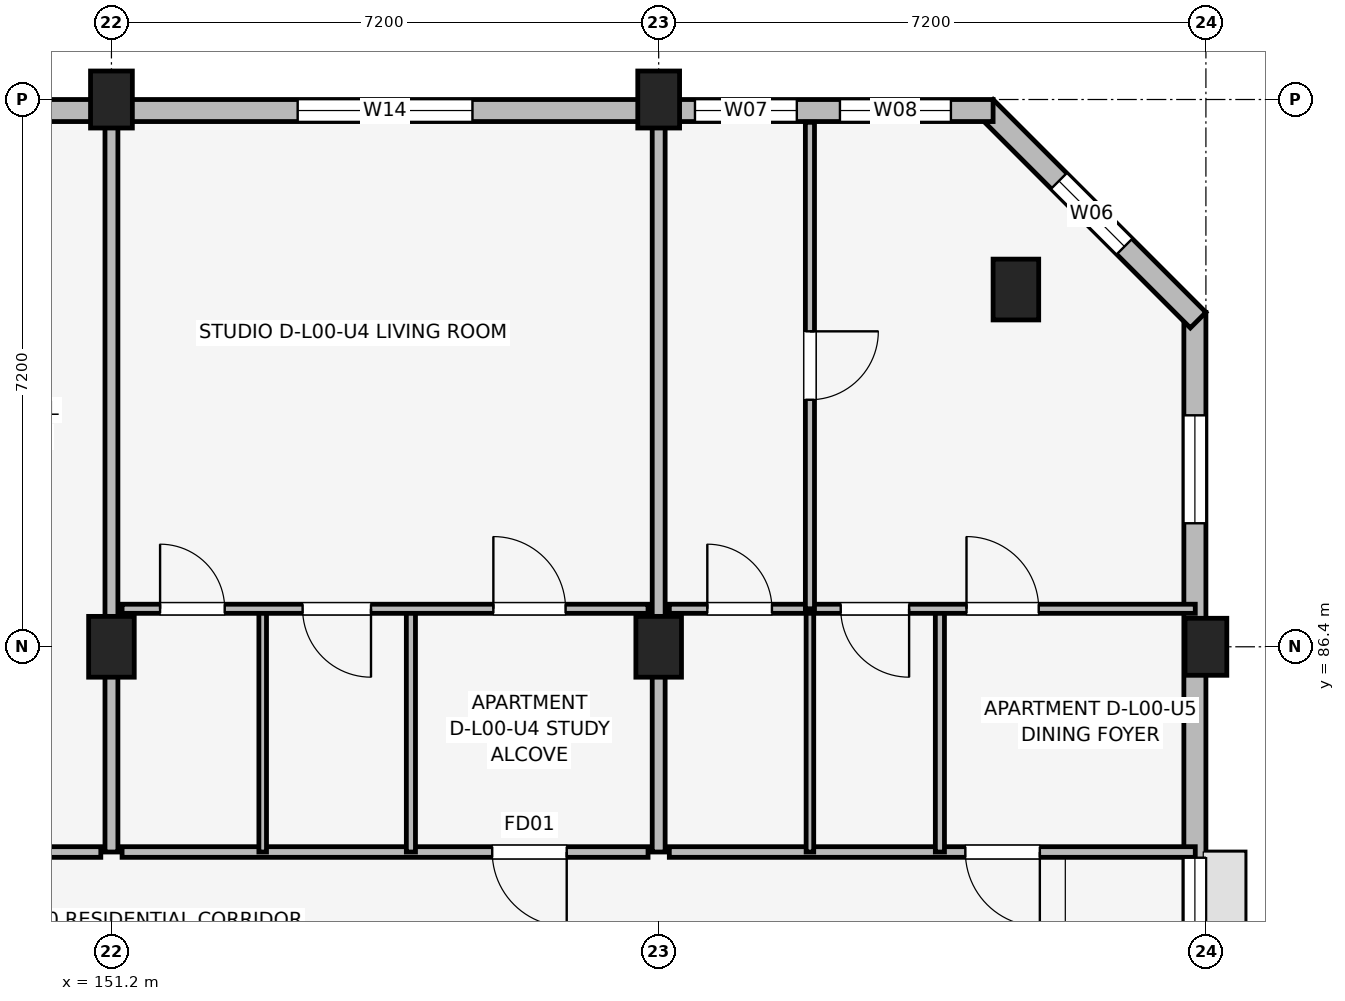
"""IFC4 building model, lengths in metres.
Left out: names, types, materials, properties, quantities, classifications, styles, units other than length and angle.
Written with IfcOpenShell. Run it as: python <this file> out.ifc"""

import sys

from ifc_helpers import new_model, si_unit, direction, frame, frame_2d, origin, origin_2d, place, context, subcontext, project, spatial, rectangle, extrude, element, fill, save


model = new_model("IFC4")
c1 = context("Model", 3, precision=1e-05, world=origin(), true_north=direction((0.0, 1.0)))
c2 = subcontext(c1, "Body", "Model", "MODEL_VIEW")
j1 = project(units=[si_unit("LENGTHUNIT", "METRE"), si_unit("PLANEANGLEUNIT", "RADIAN")], contexts=[c1])
p1 = place(None, origin())
s1 = spatial("IfcSite", under=j1, at=p1, CompositionType="ELEMENT")
p2 = place(p1, origin())
s2 = spatial("IfcBuilding", under=s1, at=p2, CompositionType="ELEMENT")
p3 = place(p2, origin())
s3 = spatial("IfcBuildingStorey", under=s2, at=p3, CompositionType="ELEMENT", Elevation=0.0)
p4 = place(p3, frame((151.2, 86.4, 0.0), z_axis=(0.0, 0.0, 1.0), x_axis=(1.0, 0.0, 0.0)))
e1 = element("IfcColumn", 1, at=p4, inside=s3, PredefinedType="COLUMN", context=c2, shape_type="SweptSolid", body=[
    extrude(rectangle(XDim=0.6, YDim=0.8, at=origin_2d()), origin(), (0.0, 0.0, 1.0), 4.5),
])
p5 = place(p3, frame((151.2, 93.6, 0.0), z_axis=(0.0, 0.0, 1.0), x_axis=(1.0, 0.0, 0.0)))
e2 = element("IfcColumn", 2, at=p5, inside=s3, PredefinedType="COLUMN", context=c2, shape_type="SweptSolid", body=[
    extrude(rectangle(XDim=0.55, YDim=0.75, at=origin_2d()), origin(), (0.0, 0.0, 1.0), 4.5),
])
p6 = place(p3, frame((158.4, 86.4, 0.0), z_axis=(0.0, 0.0, 1.0), x_axis=(1.0, 0.0, 0.0)))
e3 = element("IfcColumn", 3, at=p6, inside=s3, PredefinedType="COLUMN", context=c2, shape_type="SweptSolid", body=[
    extrude(rectangle(XDim=0.6, YDim=0.8, at=origin_2d()), origin(), (0.0, 0.0, 1.0), 4.5),
])
for number, where, z_axis, x_axis in (
    (4, (158.4, 93.6, 0.0), (0.0, 0.0, 1.0), (1.0, 0.0, 0.0)),
    (5, (165.6, 86.4, 0.0), (0.0, 0.0, 1.0), (1.0, 0.0, 0.0)),
):
    element("IfcColumn", number, at=place(p3, frame(where, z_axis=z_axis, x_axis=x_axis)), inside=s3, PredefinedType="COLUMN", context=c2, shape_type="SweptSolid", body=[
        extrude(rectangle(XDim=0.55, YDim=0.75, at=origin_2d()), origin(), (0.0, 0.0, 1.0), 4.5),
    ])
p7 = place(p3, frame((163.1, 91.1, 0.0), z_axis=(0.0, 0.0, 1.0), x_axis=(1.0, 0.0, 0.0)))
e6 = element("IfcColumn", 6, at=p7, inside=s3, PredefinedType="COLUMN", context=c2, shape_type="SweptSolid", body=[
    extrude(rectangle(XDim=0.6, YDim=0.8, at=origin_2d()), origin(), (0.0, 0.0, 1.0), 4.5),
])
p8 = place(p3, frame((165.455, 74.8, 0.0), z_axis=(0.0, 0.0, 1.0), x_axis=(0.0, 1.0, 0.0)))
e7 = element("IfcWall", 7, at=p8, inside=s3, PredefinedType="SOLIDWALL", context=c2, shape_type="SweptSolid", body=[
    extrude(rectangle(XDim=16.0, YDim=0.29, at=frame_2d((8.0, 0.0))), origin(), (0.0, 0.0, 1.0), 3.33),
])
p9 = place(p8, frame((7.175, 0.0, 1.05)))
e8 = element("IfcOpeningElement", 8, at=p9, cuts=e7, PredefinedType="OPENING", context=c2, shape_type="SweptSolid", body=[
    extrude(rectangle(XDim=1.65, YDim=1.15, at=frame_2d((0.825, 0.575))), frame((0.0, 0.155, 0.0), z_axis=(0.0, -1.0, 0.0), x_axis=(1.0, 0.0, 0.0)), (0.0, 0.0, 1.0), 0.31),
])
p10 = place(p8, frame((13.225, 0.0, 0.75)))
e9 = element("IfcOpeningElement", 9, at=p10, cuts=e7, PredefinedType="OPENING", context=c2, shape_type="SweptSolid", body=[
    extrude(rectangle(XDim=1.42, YDim=1.6, at=frame_2d((0.71, 0.8))), frame((0.0, 0.155, 0.0), z_axis=(0.0, -1.0, 0.0), x_axis=(1.0, 0.0, 0.0)), (0.0, 0.0, 1.0), 0.31),
])
p11 = place(p3, frame((165.498, 90.698, 0.0), z_axis=(0.0, 0.0, 1.0), x_axis=(-0.707106781187, 0.707106781187, 0.0)))
e10 = element("IfcWall", 10, at=p11, inside=s3, PredefinedType="SOLIDWALL", context=c2, shape_type="SweptSolid", body=[
    extrude(rectangle(XDim=3.96, YDim=0.29, at=frame_2d((1.98, 0.0))), origin(), (0.0, 0.0, 1.0), 4.175),
])
p12 = place(p11, frame((1.37, 0.0, 0.85)))
e11 = element("IfcOpeningElement", 11, at=p12, cuts=e10, PredefinedType="OPENING", context=c2, shape_type="SweptSolid", body=[
    extrude(rectangle(XDim=1.22, YDim=1.5, at=frame_2d((0.61, 0.75))), frame((0.0, 0.155, 0.0), z_axis=(0.0, -1.0, 0.0), x_axis=(1.0, 0.0, 0.0)), (0.0, 0.0, 1.0), 0.31),
])
p13 = place(p3, frame((162.8, 93.455, 0.0), z_axis=(0.0, 0.0, 1.0), x_axis=(-1.0, 0.0, 0.0)))
e12 = element("IfcWall", 12, at=p13, inside=s3, PredefinedType="SOLIDWALL", context=c2, shape_type="SweptSolid", body=[
    extrude(rectangle(XDim=30.4, YDim=0.29, at=frame_2d((15.2, 0.0))), origin(), (0.0, 0.0, 1.0), 3.33),
])
p14 = place(p13, frame((17.65, 0.0, 0.0), z_axis=(0.0, 0.0, 1.0), x_axis=(-1.0, 0.0, 0.0)))
e13 = element("IfcOpeningElement", 13, at=p14, cuts=e12, PredefinedType="OPENING", context=c2, shape_type="SweptSolid", body=[
    extrude(rectangle(XDim=1.8, YDim=2.4, at=frame_2d((0.9, 1.2))), frame((0.0, 0.155, 0.0), z_axis=(0.0, -1.0, 0.0), x_axis=(1.0, 0.0, 0.0)), (0.0, 0.0, 1.0), 0.31),
])
p15 = place(p13, frame((27.343, 0.0, 0.7)))
e14 = element("IfcOpeningElement", 14, at=p15, cuts=e12, PredefinedType="OPENING", context=c2, shape_type="SweptSolid", body=[
    extrude(rectangle(XDim=1.86, YDim=1.6, at=frame_2d((0.93, 0.8))), frame((0.0, 0.155, 0.0), z_axis=(0.0, -1.0, 0.0), x_axis=(1.0, 0.0, 0.0)), (0.0, 0.0, 1.0), 0.31),
])
p16 = place(p13, frame((24.238, 0.0, 0.75)))
e15 = element("IfcOpeningElement", 15, at=p16, cuts=e12, PredefinedType="OPENING", context=c2, shape_type="SweptSolid", body=[
    extrude(rectangle(XDim=0.98, YDim=1.45, at=frame_2d((0.49, 0.725))), frame((0.0, 0.155, 0.0), z_axis=(0.0, -1.0, 0.0), x_axis=(1.0, 0.0, 0.0)), (0.0, 0.0, 1.0), 0.31),
])
p17 = place(p13, frame((20.357, 0.0, 0.7)))
e16 = element("IfcOpeningElement", 16, at=p17, cuts=e12, PredefinedType="OPENING", context=c2, shape_type="SweptSolid", body=[
    extrude(rectangle(XDim=2.15, YDim=1.65, at=frame_2d((1.075, 0.825))), frame((0.0, 0.155, 0.0), z_axis=(0.0, -1.0, 0.0), x_axis=(1.0, 0.0, 0.0)), (0.0, 0.0, 1.0), 0.31),
])
p18 = place(p13, frame((6.85, 0.0, 0.7)))
e17 = element("IfcOpeningElement", 17, at=p18, cuts=e12, PredefinedType="OPENING", context=c2, shape_type="SweptSolid", body=[
    extrude(rectangle(XDim=2.3, YDim=1.65, at=frame_2d((1.15, 0.825))), frame((0.0, 0.155, 0.0), z_axis=(0.0, -1.0, 0.0), x_axis=(1.0, 0.0, 0.0)), (0.0, 0.0, 1.0), 0.31),
])
p19 = place(p13, frame((2.583, 0.0, 0.75)))
e18 = element("IfcOpeningElement", 18, at=p19, cuts=e12, PredefinedType="OPENING", context=c2, shape_type="SweptSolid", body=[
    extrude(rectangle(XDim=1.34, YDim=1.55, at=frame_2d((0.67, 0.775))), frame((0.0, 0.155, 0.0), z_axis=(0.0, -1.0, 0.0), x_axis=(1.0, 0.0, 0.0)), (0.0, 0.0, 1.0), 0.31),
])
p20 = place(p13, frame((0.555, 0.0, 0.75)))
e19 = element("IfcOpeningElement", 19, at=p20, cuts=e12, PredefinedType="OPENING", context=c2, shape_type="SweptSolid", body=[
    extrude(rectangle(XDim=1.46, YDim=1.55, at=frame_2d((0.73, 0.775))), frame((0.0, 0.155, 0.0), z_axis=(0.0, -1.0, 0.0), x_axis=(1.0, 0.0, 0.0)), (0.0, 0.0, 1.0), 0.31),
])
p21 = place(p3, frame((144.14, 83.7, 0.0), z_axis=(0.0, 0.0, 1.0), x_axis=(1.0, 0.0, 0.0)))
e20 = element("IfcWall", 20, at=p21, inside=s3, PredefinedType="PARTITIONING", context=c2, shape_type="SweptSolid", body=[
    extrude(rectangle(XDim=6.92, YDim=0.14, at=frame_2d((3.46, 0.0))), origin(), (0.0, 0.0, 1.0), 3.15),
])
p22 = place(p21, frame((2.65, 0.0, 0.0), z_axis=(0.0, 0.0, 1.0), x_axis=(-1.0, 0.0, 0.0)))
e21 = element("IfcOpeningElement", 21, at=p22, cuts=e20, PredefinedType="OPENING", context=c2, shape_type="SweptSolid", body=[
    extrude(rectangle(XDim=1.4, YDim=2.22, at=frame_2d((0.7, 1.11))), frame((0.0, 0.08, 0.0), z_axis=(0.0, -1.0, 0.0), x_axis=(1.0, 0.0, 0.0)), (0.0, 0.0, 1.0), 0.16),
])
p23 = place(p21, frame((5.07, 0.0, 0.0)))
e22 = element("IfcOpeningElement", 22, at=p23, cuts=e20, PredefinedType="OPENING", context=c2, shape_type="SweptSolid", body=[
    extrude(rectangle(XDim=1.0, YDim=2.12, at=frame_2d((0.5, 1.06))), frame((0.0, 0.08, 0.0), z_axis=(0.0, -1.0, 0.0), x_axis=(1.0, 0.0, 0.0)), (0.0, 0.0, 1.0), 0.16),
])
p24 = place(p3, frame((151.2, 83.7, 0.0), z_axis=(0.0, 0.0, 1.0), x_axis=(0.0, 1.0, 0.0)))
e23 = element("IfcWall", 23, at=p24, inside=s3, PredefinedType="PARTITIONING", context=c2, shape_type="SweptSolid", body=[
    extrude(rectangle(XDim=9.6, YDim=0.17, at=frame_2d((4.8, 0.0))), origin(), (0.0, 0.0, 1.0), 3.15),
])
p25 = place(p3, frame((151.34, 83.7, 0.0), z_axis=(0.0, 0.0, 1.0), x_axis=(1.0, 0.0, 0.0)))
e24 = element("IfcWall", 24, at=p25, inside=s3, PredefinedType="PARTITIONING", context=c2, shape_type="SweptSolid", body=[
    extrude(rectangle(XDim=6.92, YDim=0.14, at=frame_2d((3.46, 0.0))), origin(), (0.0, 0.0, 1.0), 3.15),
])
p26 = place(p25, frame((5.85, 0.0, 0.0), z_axis=(0.0, 0.0, 1.0), x_axis=(-1.0, 0.0, 0.0)))
e25 = element("IfcOpeningElement", 25, at=p26, cuts=e24, PredefinedType="OPENING", context=c2, shape_type="SweptSolid", body=[
    extrude(rectangle(XDim=0.98, YDim=2.1, at=frame_2d((0.49, 1.05))), frame((0.0, 0.08, 0.0), z_axis=(0.0, -1.0, 0.0), x_axis=(1.0, 0.0, 0.0)), (0.0, 0.0, 1.0), 0.16),
])
p27 = place(p3, frame((153.19, 83.7, 0.0), z_axis=(0.0, 0.0, 1.0), x_axis=(0.0, 1.0, 0.0)))
e26 = element("IfcWall", 26, at=p27, inside=s3, PredefinedType="PARTITIONING", context=c2, shape_type="SweptSolid", body=[
    extrude(rectangle(XDim=3.2, YDim=0.1, at=frame_2d((1.6, 0.0))), origin(), (0.0, 0.0, 1.0), 3.15),
])
p28 = place(p3, frame((155.14, 83.7, 0.0), z_axis=(0.0, 0.0, 1.0), x_axis=(0.0, 1.0, 0.0)))
e27 = element("IfcWall", 27, at=p28, inside=s3, PredefinedType="PARTITIONING", context=c2, shape_type="SweptSolid", body=[
    extrude(rectangle(XDim=3.2, YDim=0.12, at=frame_2d((1.6, 0.0))), origin(), (0.0, 0.0, 1.0), 3.15),
])
p29 = place(p3, frame((151.34, 86.9, 0.0), z_axis=(0.0, 0.0, 1.0), x_axis=(1.0, 0.0, 0.0)))
e28 = element("IfcWall", 28, at=p29, inside=s3, PredefinedType="PARTITIONING", context=c2, shape_type="SweptSolid", body=[
    extrude(rectangle(XDim=6.92, YDim=0.12, at=frame_2d((3.46, 0.0))), origin(), (0.0, 0.0, 1.0), 3.15),
])
p30 = place(p29, frame((0.5, 0.0, 0.0)))
e29 = element("IfcOpeningElement", 29, at=p30, cuts=e28, PredefinedType="OPENING", context=c2, shape_type="SweptSolid", body=[
    extrude(rectangle(XDim=0.85, YDim=2.08, at=frame_2d((0.425, 1.04))), frame((0.0, 0.07, 0.0), z_axis=(0.0, -1.0, 0.0), x_axis=(1.0, 0.0, 0.0)), (0.0, 0.0, 1.0), 0.14),
])
p31 = place(p29, frame((3.275, 0.0, 0.0), z_axis=(0.0, 0.0, 1.0), x_axis=(-1.0, 0.0, 0.0)))
e30 = element("IfcOpeningElement", 30, at=p31, cuts=e28, PredefinedType="OPENING", context=c2, shape_type="SweptSolid", body=[
    extrude(rectangle(XDim=0.9, YDim=2.08, at=frame_2d((0.45, 1.04))), frame((0.0, 0.07, 0.0), z_axis=(0.0, -1.0, 0.0), x_axis=(1.0, 0.0, 0.0)), (0.0, 0.0, 1.0), 0.14),
])
p32 = place(p29, frame((4.885, 0.0, 0.0)))
e31 = element("IfcOpeningElement", 31, at=p32, cuts=e28, PredefinedType="OPENING", context=c2, shape_type="SweptSolid", body=[
    extrude(rectangle(XDim=0.95, YDim=2.08, at=frame_2d((0.475, 1.04))), frame((0.0, 0.07, 0.0), z_axis=(0.0, -1.0, 0.0), x_axis=(1.0, 0.0, 0.0)), (0.0, 0.0, 1.0), 0.14),
])
p33 = place(p3, frame((158.4, 83.7, 0.0), z_axis=(0.0, 0.0, 1.0), x_axis=(0.0, 1.0, 0.0)))
e32 = element("IfcWall", 32, at=p33, inside=s3, PredefinedType="PARTITIONING", context=c2, shape_type="SweptSolid", body=[
    extrude(rectangle(XDim=9.6, YDim=0.17, at=frame_2d((4.8, 0.0))), origin(), (0.0, 0.0, 1.0), 3.15),
])
p34 = place(p3, frame((158.54, 83.7, 0.0), z_axis=(0.0, 0.0, 1.0), x_axis=(1.0, 0.0, 0.0)))
e33 = element("IfcWall", 33, at=p34, inside=s3, PredefinedType="PARTITIONING", context=c2, shape_type="SweptSolid", body=[
    extrude(rectangle(XDim=6.92, YDim=0.14, at=frame_2d((3.46, 0.0))), origin(), (0.0, 0.0, 1.0), 3.15),
])
p35 = place(p34, frame((4.875, 0.0, 0.0), z_axis=(0.0, 0.0, 1.0), x_axis=(-1.0, 0.0, 0.0)))
e34 = element("IfcOpeningElement", 34, at=p35, cuts=e33, PredefinedType="OPENING", context=c2, shape_type="SweptSolid", body=[
    extrude(rectangle(XDim=0.98, YDim=2.1, at=frame_2d((0.49, 1.05))), frame((0.0, 0.08, 0.0), z_axis=(0.0, -1.0, 0.0), x_axis=(1.0, 0.0, 0.0)), (0.0, 0.0, 1.0), 0.16),
])
p36 = place(p3, frame((160.39, 83.7, 0.0), z_axis=(0.0, 0.0, 1.0), x_axis=(0.0, 1.0, 0.0)))
e35 = element("IfcWall", 35, at=p36, inside=s3, PredefinedType="PARTITIONING", context=c2, shape_type="SweptSolid", body=[
    extrude(rectangle(XDim=3.2, YDim=0.1, at=frame_2d((1.6, 0.0))), origin(), (0.0, 0.0, 1.0), 3.15),
])
p37 = place(p3, frame((162.1, 83.7, 0.0), z_axis=(0.0, 0.0, 1.0), x_axis=(0.0, 1.0, 0.0)))
e36 = element("IfcWall", 36, at=p37, inside=s3, PredefinedType="PARTITIONING", context=c2, shape_type="SweptSolid", body=[
    extrude(rectangle(XDim=3.2, YDim=0.12, at=frame_2d((1.6, 0.0))), origin(), (0.0, 0.0, 1.0), 3.15),
])
p38 = place(p3, frame((158.54, 86.9, 0.0), z_axis=(0.0, 0.0, 1.0), x_axis=(1.0, 0.0, 0.0)))
e37 = element("IfcWall", 37, at=p38, inside=s3, PredefinedType="PARTITIONING", context=c2, shape_type="SweptSolid", body=[
    extrude(rectangle(XDim=6.92, YDim=0.12, at=frame_2d((3.46, 0.0))), origin(), (0.0, 0.0, 1.0), 3.15),
])
p39 = place(p38, frame((0.5, 0.0, 0.0)))
e38 = element("IfcOpeningElement", 38, at=p39, cuts=e37, PredefinedType="OPENING", context=c2, shape_type="SweptSolid", body=[
    extrude(rectangle(XDim=0.85, YDim=2.08, at=frame_2d((0.425, 1.04))), frame((0.0, 0.07, 0.0), z_axis=(0.0, -1.0, 0.0), x_axis=(1.0, 0.0, 0.0)), (0.0, 0.0, 1.0), 0.14),
])
p40 = place(p38, frame((3.155, 0.0, 0.0), z_axis=(0.0, 0.0, 1.0), x_axis=(-1.0, 0.0, 0.0)))
e39 = element("IfcOpeningElement", 39, at=p40, cuts=e37, PredefinedType="OPENING", context=c2, shape_type="SweptSolid", body=[
    extrude(rectangle(XDim=0.9, YDim=2.08, at=frame_2d((0.45, 1.04))), frame((0.0, 0.07, 0.0), z_axis=(0.0, -1.0, 0.0), x_axis=(1.0, 0.0, 0.0)), (0.0, 0.0, 1.0), 0.14),
])
p41 = place(p38, frame((3.91, 0.0, 0.0)))
e40 = element("IfcOpeningElement", 40, at=p41, cuts=e37, PredefinedType="OPENING", context=c2, shape_type="SweptSolid", body=[
    extrude(rectangle(XDim=0.95, YDim=2.08, at=frame_2d((0.475, 1.04))), frame((0.0, 0.07, 0.0), z_axis=(0.0, -1.0, 0.0), x_axis=(1.0, 0.0, 0.0)), (0.0, 0.0, 1.0), 0.14),
])
p42 = place(p3, frame((160.39, 86.9, 0.0), z_axis=(0.0, 0.0, 1.0), x_axis=(0.0, 1.0, 0.0)))
e41 = element("IfcWall", 41, at=p42, inside=s3, PredefinedType="PARTITIONING", context=c2, shape_type="SweptSolid", body=[
    extrude(rectangle(XDim=6.4, YDim=0.12, at=frame_2d((3.2, 0.0))), origin(), (0.0, 0.0, 1.0), 3.15),
])
p43 = place(p42, frame((3.65, 0.0, 0.0), z_axis=(0.0, 0.0, 1.0), x_axis=(-1.0, 0.0, 0.0)))
e42 = element("IfcOpeningElement", 42, at=p43, cuts=e41, PredefinedType="OPENING", context=c2, shape_type="SweptSolid", body=[
    extrude(rectangle(XDim=0.9, YDim=2.08, at=frame_2d((0.45, 1.04))), frame((0.0, 0.07, 0.0), z_axis=(0.0, -1.0, 0.0), x_axis=(1.0, 0.0, 0.0)), (0.0, 0.0, 1.0), 0.14),
])
p44 = place(p12, origin())
e43 = element("IfcWindow", 43, at=p44, inside=s3, PartitioningType="SINGLE_PANEL", PredefinedType="WINDOW", context=c2, shape_type="SweptSolid", body=[
    extrude(rectangle(XDim=1.22, YDim=1.5, at=frame_2d((0.61, 0.75))), frame((0.0, 0.03, 0.0), z_axis=(0.0, -1.0, 0.0), x_axis=(1.0, 0.0, 0.0)), (0.0, 0.0, 1.0), 0.06),
])
fill(e11, e43)
p45 = place(p18, origin())
e44 = element("IfcWindow", 44, at=p45, inside=s3, PartitioningType="SINGLE_PANEL", PredefinedType="WINDOW", context=c2, shape_type="SweptSolid", body=[
    extrude(rectangle(XDim=2.3, YDim=1.65, at=frame_2d((1.15, 0.825))), frame((0.0, 0.03, 0.0), z_axis=(0.0, -1.0, 0.0), x_axis=(1.0, 0.0, 0.0)), (0.0, 0.0, 1.0), 0.06),
])
fill(e17, e44)
p46 = place(p19, origin())
e45 = element("IfcWindow", 45, at=p46, inside=s3, PartitioningType="SINGLE_PANEL", PredefinedType="WINDOW", context=c2, shape_type="SweptSolid", body=[
    extrude(rectangle(XDim=1.34, YDim=1.55, at=frame_2d((0.67, 0.775))), frame((0.0, 0.03, 0.0), z_axis=(0.0, -1.0, 0.0), x_axis=(1.0, 0.0, 0.0)), (0.0, 0.0, 1.0), 0.06),
])
fill(e18, e45)
p47 = place(p20, origin())
e46 = element("IfcWindow", 46, at=p47, inside=s3, PartitioningType="SINGLE_PANEL", PredefinedType="WINDOW", context=c2, shape_type="SweptSolid", body=[
    extrude(rectangle(XDim=1.46, YDim=1.55, at=frame_2d((0.73, 0.775))), frame((0.0, 0.03, 0.0), z_axis=(0.0, -1.0, 0.0), x_axis=(1.0, 0.0, 0.0)), (0.0, 0.0, 1.0), 0.06),
])
fill(e19, e46)
p48 = place(p9, origin())
e47 = element("IfcWindow", 47, at=p48, inside=s3, PartitioningType="SINGLE_PANEL", PredefinedType="WINDOW", context=c2, shape_type="SweptSolid", body=[
    extrude(rectangle(XDim=1.65, YDim=1.15, at=frame_2d((0.825, 0.575))), frame((0.0, 0.03, 0.0), z_axis=(0.0, -1.0, 0.0), x_axis=(1.0, 0.0, 0.0)), (0.0, 0.0, 1.0), 0.06),
])
fill(e8, e47)
p49 = place(p10, origin())
e48 = element("IfcWindow", 48, at=p49, inside=s3, PartitioningType="SINGLE_PANEL", PredefinedType="WINDOW", context=c2, shape_type="SweptSolid", body=[
    extrude(rectangle(XDim=1.42, YDim=1.6, at=frame_2d((0.71, 0.8))), frame((0.0, 0.03, 0.0), z_axis=(0.0, -1.0, 0.0), x_axis=(1.0, 0.0, 0.0)), (0.0, 0.0, 1.0), 0.06),
])
fill(e9, e48)
p50 = place(p26, origin())
e49 = element("IfcDoor", 49, at=p50, inside=s3, OperationType="SINGLE_SWING_RIGHT", PredefinedType="DOOR", context=c2, shape_type="SweptSolid", body=[
    extrude(rectangle(XDim=0.98, YDim=2.1, at=frame_2d((0.49, 1.05))), frame((0.0, 0.025, 0.0), z_axis=(0.0, -1.0, 0.0), x_axis=(1.0, 0.0, 0.0)), (0.0, 0.0, 1.0), 0.05),
])
fill(e25, e49)
p51 = place(p30, origin())
e50 = element("IfcDoor", 50, at=p51, inside=s3, OperationType="SINGLE_SWING_LEFT", PredefinedType="DOOR", context=c2, shape_type="SweptSolid", body=[
    extrude(rectangle(XDim=0.85, YDim=2.08, at=frame_2d((0.425, 1.04))), frame((0.0, 0.025, 0.0), z_axis=(0.0, -1.0, 0.0), x_axis=(1.0, 0.0, 0.0)), (0.0, 0.0, 1.0), 0.05),
])
fill(e29, e50)
p52 = place(p31, origin())
e51 = element("IfcDoor", 51, at=p52, inside=s3, OperationType="SINGLE_SWING_RIGHT", PredefinedType="DOOR", context=c2, shape_type="SweptSolid", body=[
    extrude(rectangle(XDim=0.9, YDim=2.08, at=frame_2d((0.45, 1.04))), frame((0.0, 0.025, 0.0), z_axis=(0.0, -1.0, 0.0), x_axis=(1.0, 0.0, 0.0)), (0.0, 0.0, 1.0), 0.05),
])
fill(e30, e51)
p53 = place(p32, origin())
e52 = element("IfcDoor", 52, at=p53, inside=s3, OperationType="SINGLE_SWING_LEFT", PredefinedType="DOOR", context=c2, shape_type="SweptSolid", body=[
    extrude(rectangle(XDim=0.95, YDim=2.08, at=frame_2d((0.475, 1.04))), frame((0.0, 0.025, 0.0), z_axis=(0.0, -1.0, 0.0), x_axis=(1.0, 0.0, 0.0)), (0.0, 0.0, 1.0), 0.05),
])
fill(e31, e52)
p54 = place(p35, origin())
e53 = element("IfcDoor", 53, at=p54, inside=s3, OperationType="SINGLE_SWING_RIGHT", PredefinedType="DOOR", context=c2, shape_type="SweptSolid", body=[
    extrude(rectangle(XDim=0.98, YDim=2.1, at=frame_2d((0.49, 1.05))), frame((0.0, 0.025, 0.0), z_axis=(0.0, -1.0, 0.0), x_axis=(1.0, 0.0, 0.0)), (0.0, 0.0, 1.0), 0.05),
])
fill(e34, e53)
p55 = place(p39, origin())
e54 = element("IfcDoor", 54, at=p55, inside=s3, OperationType="SINGLE_SWING_LEFT", PredefinedType="DOOR", context=c2, shape_type="SweptSolid", body=[
    extrude(rectangle(XDim=0.85, YDim=2.08, at=frame_2d((0.425, 1.04))), frame((0.0, 0.025, 0.0), z_axis=(0.0, -1.0, 0.0), x_axis=(1.0, 0.0, 0.0)), (0.0, 0.0, 1.0), 0.05),
])
fill(e38, e54)
p56 = place(p40, origin())
e55 = element("IfcDoor", 55, at=p56, inside=s3, OperationType="SINGLE_SWING_RIGHT", PredefinedType="DOOR", context=c2, shape_type="SweptSolid", body=[
    extrude(rectangle(XDim=0.9, YDim=2.08, at=frame_2d((0.45, 1.04))), frame((0.0, 0.025, 0.0), z_axis=(0.0, -1.0, 0.0), x_axis=(1.0, 0.0, 0.0)), (0.0, 0.0, 1.0), 0.05),
])
fill(e39, e55)
p57 = place(p41, origin())
e56 = element("IfcDoor", 56, at=p57, inside=s3, OperationType="SINGLE_SWING_LEFT", PredefinedType="DOOR", context=c2, shape_type="SweptSolid", body=[
    extrude(rectangle(XDim=0.95, YDim=2.08, at=frame_2d((0.475, 1.04))), frame((0.0, 0.025, 0.0), z_axis=(0.0, -1.0, 0.0), x_axis=(1.0, 0.0, 0.0)), (0.0, 0.0, 1.0), 0.05),
])
fill(e40, e56)
p58 = place(p43, origin())
e57 = element("IfcDoor", 57, at=p58, inside=s3, OperationType="SINGLE_SWING_RIGHT", PredefinedType="DOOR", context=c2, shape_type="SweptSolid", body=[
    extrude(rectangle(XDim=0.9, YDim=2.08, at=frame_2d((0.45, 1.04))), frame((0.0, 0.025, 0.0), z_axis=(0.0, -1.0, 0.0), x_axis=(1.0, 0.0, 0.0)), (0.0, 0.0, 1.0), 0.05),
])
fill(e42, e57)
save(model, sys.argv[1])
